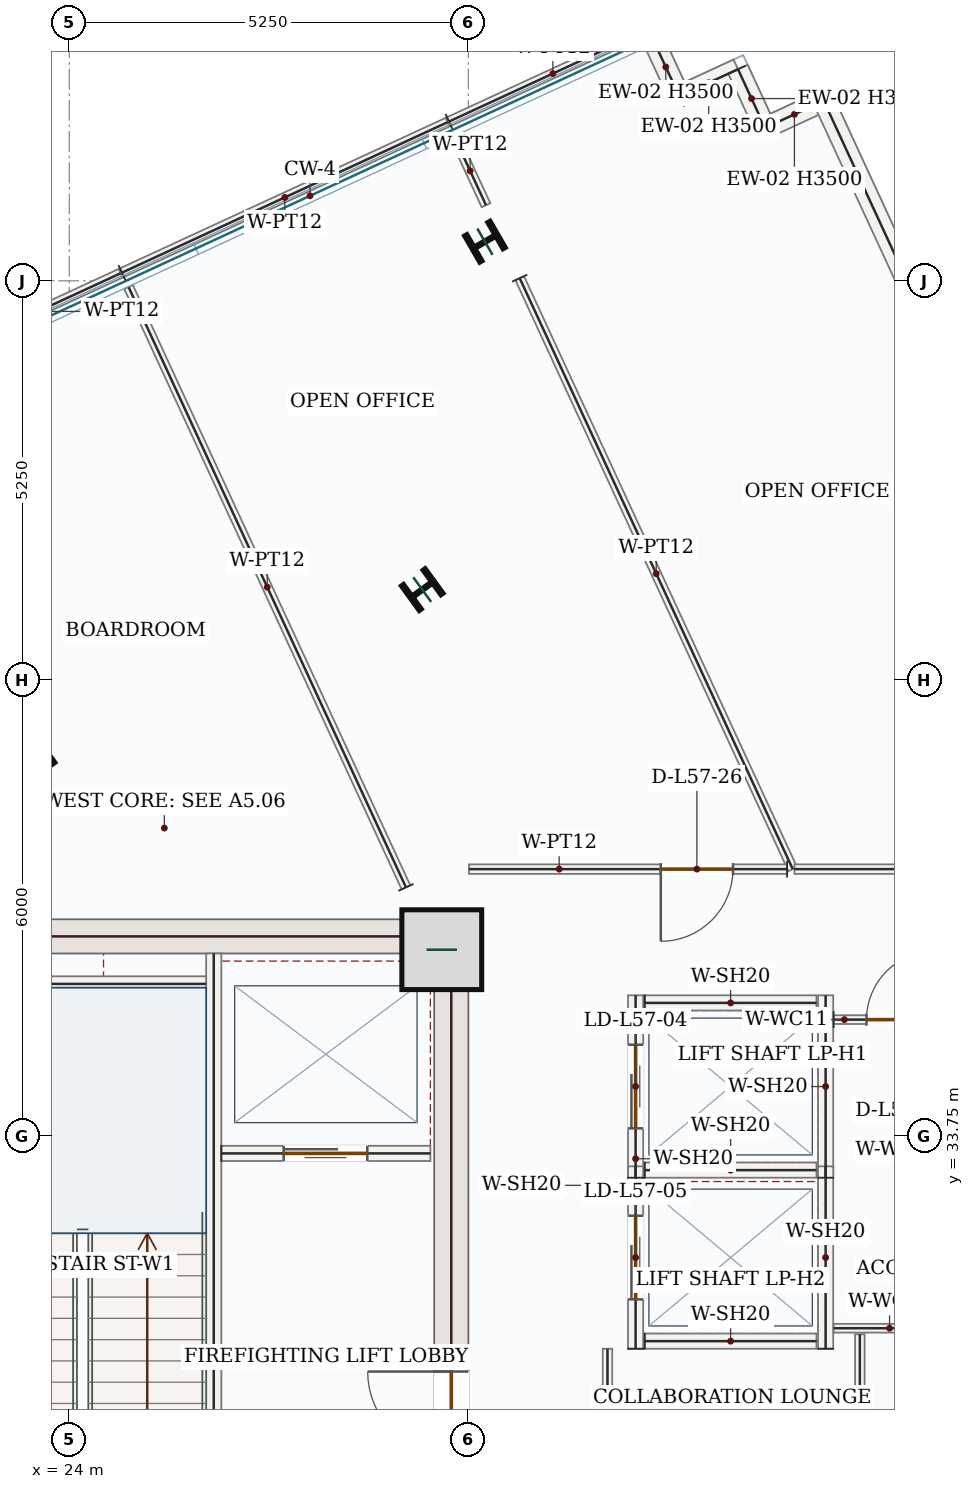
"""IFC4 building model, lengths in metres.
Left out: names, types, materials, properties, quantities, classifications, styles, units other than length and angle.
Written with IfcOpenShell. Run it as: python <this file> out.ifc"""

import sys

from ifc_helpers import new_model, si_unit, direction, frame, frame_2d, origin, origin_2d, place, context, subcontext, project, spatial, rectangle, i_section, extrude, source, transform, mapped, element, fill, save


model = new_model("IFC4")
c1 = context("Model", 3, precision=1e-05, world=origin(), true_north=direction((0.0, 1.0)))
c2 = subcontext(c1, "Body", "Model", "MODEL_VIEW")
j1 = project(units=[si_unit("LENGTHUNIT", "METRE"), si_unit("PLANEANGLEUNIT", "RADIAN")], contexts=[c1])
p1 = place(None, origin())
s1 = spatial("IfcSite", under=j1, at=p1, CompositionType="ELEMENT")
p2 = place(p1, origin())
s2 = spatial("IfcBuilding", under=s1, at=p2, CompositionType="ELEMENT")
p3 = place(p2, frame((0.0, 0.0, 242.85)))
s3 = spatial("IfcBuildingStorey", under=s2, at=p3, CompositionType="ELEMENT", Elevation=242.85)
p4 = place(p3, frame((29.025, 28.05, 0.0), z_axis=(0.0, 0.0, 1.0), x_axis=(0.0, 1.0, 0.0)))
e1 = element("IfcWall", 1, at=p4, inside=s3, PredefinedType="SHEAR", context=c2, shape_type="SweptSolid", body=[
    extrude(rectangle(XDim=8.55, YDim=0.45, at=frame_2d((4.275, 0.0))), origin(), (0.0, 0.0, 1.0), 3.5),
])
p5 = place(p4, frame((1.5, 0.0, 0.0)))
e2 = element("IfcOpeningElement", 2, at=p5, cuts=e1, PredefinedType="OPENING", context=c2, shape_type="SweptSolid", body=[
    extrude(rectangle(XDim=1.1, YDim=2.2, at=frame_2d((0.55, 1.1))), frame((0.0, 0.235, 0.0), z_axis=(0.0, -1.0, 0.0), x_axis=(1.0, 0.0, 0.0)), (0.0, 0.0, 1.0), 0.47),
])
m1 = source(origin(), c2, "Body", "SweptSolid", [
    extrude(rectangle(XDim=7.1, YDim=0.45, at=frame_2d((3.55, 0.0))), origin(), (0.0, 0.0, 1.0), 3.5),
])
p6 = place(p3, frame((21.7, 36.375, 0.0), z_axis=(0.0, 0.0, 1.0), x_axis=(1.0, 0.0, 0.0)))
e3 = element("IfcWall", 3, at=p6, inside=s3, PredefinedType="SHEAR", context=c2, shape_type="MappedRepresentation", body=[
    mapped(m1, transform((0.0, 0.0, 0.0), x_axis=(1.0, 0.0, 0.0), y_axis=(0.0, 1.0, 0.0), z_axis=(0.0, 0.0, 1.0), scale=1.0)),
])
m2 = source(origin(), c2, "Body", "SweptSolid", [
    extrude(rectangle(XDim=1.05, YDim=1.05, at=origin_2d()), origin(), (0.0, 0.0, 1.0), 3.75),
])
p7 = place(p3, frame((28.9, 36.2, 0.0), z_axis=(0.0, 0.0, 1.0), x_axis=(1.0, 0.0, 0.0)))
e4 = element("IfcColumn", 4, at=p7, inside=s3, PredefinedType="COLUMN", context=c2, shape_type="MappedRepresentation", body=[
    mapped(m2, transform((0.0, 0.0, 0.0), x_axis=(1.0, 0.0, 0.0), y_axis=(0.0, 1.0, 0.0), z_axis=(0.0, 0.0, 1.0), scale=1.0)),
])
m3 = source(origin(), c2, "Body", "SweptSolid", [
    extrude(i_section(OverallWidth=0.399, OverallDepth=0.386, WebThickness=0.021, FlangeThickness=0.033, FilletRadius=0.018, at=origin_2d()), origin(), (0.0, 0.0, 1.0), 3.75),
])
for number, where, z_axis, x_axis in (
    (5, (28.643, 40.937, 0.0), (0.0, 0.0, 1.0), (-0.588, 0.809, 0.0)),
    (6, (23.536, 38.711, 0.0), (0.0, 0.0, 1.0), (-0.588, 0.809, 0.0)),
    (7, (29.468, 45.514, 0.0), (0.0, 0.0, 1.0), (-0.5, 0.866, 0.0)),
):
    element("IfcColumn", number, at=place(p3, frame(where, z_axis=z_axis, x_axis=x_axis)), inside=s3, PredefinedType="COLUMN", context=c2, shape_type="MappedRepresentation", body=[
        mapped(m3, transform((0.0, 0.0, 0.0), x_axis=(1.0, 0.0, 0.0), y_axis=(0.0, 1.0, 0.0), z_axis=(0.0, 0.0, 1.0), scale=1.0)),
    ])
m4 = source(origin(), c2, "Body", "SweptSolid", [
    extrude(rectangle(XDim=0.85, YDim=0.28, at=frame_2d((0.425, 0.0))), origin(), (0.0, 0.0, 1.0), 3.5),
])
p8 = place(p3, frame((31.669, 48.198, 0.0), z_axis=(0.0, 0.0, 1.0), x_axis=(0.419422493365, -0.907791150023, 0.0)))
e8 = element("IfcWall", 8, at=p8, inside=s3, PredefinedType="SOLIDWALL", context=c2, shape_type="MappedRepresentation", body=[
    mapped(m4, transform((0.0, 0.0, 0.0), x_axis=(1.0, 0.0, 0.0), y_axis=(0.0, 1.0, 0.0), z_axis=(0.0, 0.0, 1.0), scale=1.0)),
])
m5 = source(origin(), c2, "Body", "SweptSolid", [
    extrude(rectangle(XDim=0.85, YDim=0.28, at=frame_2d((0.425, 0.0))), origin(), (0.0, 0.0, 1.0), 3.5),
])
p9 = place(p3, frame((32.025, 47.427, 0.0), z_axis=(0.0, 0.0, 1.0), x_axis=(0.907841666427, 0.419313139191, 0.0)))
e9 = element("IfcWall", 9, at=p9, inside=s3, PredefinedType="SOLIDWALL", context=c2, shape_type="MappedRepresentation", body=[
    mapped(m5, transform((0.0, 0.0, 0.0), x_axis=(1.0, 0.0, 0.0), y_axis=(0.0, 1.0, 0.0), z_axis=(0.0, 0.0, 1.0), scale=1.0)),
])
p10 = place(p3, frame((32.797, 47.783, 0.0), z_axis=(0.0, 0.0, 1.0), x_axis=(0.419422493365, -0.907791150023, 0.0)))
e10 = element("IfcWall", 10, at=p10, inside=s3, PredefinedType="SOLIDWALL", context=c2, shape_type="MappedRepresentation", body=[
    mapped(m4, transform((0.0, 0.0, 0.0), x_axis=(1.0, 0.0, 0.0), y_axis=(0.0, 1.0, 0.0), z_axis=(0.0, 0.0, 1.0), scale=1.0)),
])
p11 = place(p3, frame((33.154, 47.012, 0.0), z_axis=(0.0, 0.0, 1.0), x_axis=(0.907841666427, 0.419313139191, 0.0)))
e11 = element("IfcWall", 11, at=p11, inside=s3, PredefinedType="SOLIDWALL", context=c2, shape_type="MappedRepresentation", body=[
    mapped(m5, transform((0.0, 0.0, 0.0), x_axis=(1.0, 0.0, 0.0), y_axis=(0.0, 1.0, 0.0), z_axis=(0.0, 0.0, 1.0), scale=1.0)),
])
m6 = source(origin(), c2, "Body", "SweptSolid", [
    extrude(rectangle(XDim=8.932, YDim=0.28, at=frame_2d((4.466, 0.0))), origin(), (0.0, 0.0, 1.0), 3.5),
])
p12 = place(p3, frame((33.925, 47.368, 0.0), z_axis=(0.0, 0.0, 1.0), x_axis=(0.419437747849, -0.90778410191, 0.0)))
e12 = element("IfcWall", 12, at=p12, inside=s3, PredefinedType="SOLIDWALL", context=c2, shape_type="MappedRepresentation", body=[
    mapped(m6, transform((0.0, 0.0, 0.0), x_axis=(1.0, 0.0, 0.0), y_axis=(0.0, 1.0, 0.0), z_axis=(0.0, 0.0, 1.0), scale=1.0)),
])
p13 = place(p3, frame((25.9, 28.15, 0.0), z_axis=(0.0, 0.0, 1.0), x_axis=(0.0, 1.0, 0.0)))
e13 = element("IfcWall", 13, at=p13, inside=s3, PredefinedType="SOLIDWALL", context=c2, shape_type="SweptSolid", body=[
    extrude(rectangle(XDim=8.0, YDim=0.2, at=frame_2d((4.0, 0.0))), origin(), (0.0, 0.0, 1.0), 3.5),
])
p14 = place(p13, frame((0.4, 0.0, 0.0)))
e14 = element("IfcOpeningElement", 14, at=p14, cuts=e13, PredefinedType="OPENING", context=c2, shape_type="SweptSolid", body=[
    extrude(rectangle(XDim=1.05, YDim=2.15, at=frame_2d((0.525, 1.075))), frame((0.0, 0.11, 0.0), z_axis=(0.0, -1.0, 0.0), x_axis=(1.0, 0.0, 0.0)), (0.0, 0.0, 1.0), 0.22),
])
m7 = source(origin(), c2, "Body", "SweptSolid", [
    extrude(rectangle(XDim=3.25, YDim=0.2, at=frame_2d((1.625, 0.0))), origin(), (0.0, 0.0, 1.0), 3.5),
])
p15 = place(p3, frame((22.55, 35.75, 0.0), z_axis=(0.0, 0.0, 1.0), x_axis=(1.0, 0.0, 0.0)))
e15 = element("IfcWall", 15, at=p15, inside=s3, PredefinedType="SOLIDWALL", context=c2, shape_type="MappedRepresentation", body=[
    mapped(m7, transform((0.0, 0.0, 0.0), x_axis=(1.0, 0.0, 0.0), y_axis=(0.0, 1.0, 0.0), z_axis=(0.0, 0.0, 1.0), scale=1.0)),
])
p16 = place(p3, frame((26.0, 33.52, 0.0), z_axis=(0.0, 0.0, 1.0), x_axis=(1.0, 0.0, 0.0)))
e16 = element("IfcWall", 16, at=p16, inside=s3, PredefinedType="SOLIDWALL", context=c2, shape_type="SweptSolid", body=[
    extrude(rectangle(XDim=2.75, YDim=0.2, at=frame_2d((1.375, 0.0))), origin(), (0.0, 0.0, 1.0), 3.5),
])
p17 = place(p16, frame((0.82, 0.0, 0.0)))
e17 = element("IfcOpeningElement", 17, at=p17, cuts=e16, PredefinedType="OPENING", context=c2, shape_type="SweptSolid", body=[
    extrude(rectangle(XDim=1.1, YDim=2.15, at=frame_2d((0.55, 1.075))), frame((0.0, 0.11, 0.0), z_axis=(0.0, -1.0, 0.0), x_axis=(1.0, 0.0, 0.0)), (0.0, 0.0, 1.0), 0.22),
])
p18 = place(p3, frame((31.45, 33.2, 0.0), z_axis=(0.0, 0.0, 1.0), x_axis=(0.0, 1.0, 0.0)))
e18 = element("IfcWall", 18, at=p18, inside=s3, PredefinedType="SOLIDWALL", context=c2, shape_type="SweptSolid", body=[
    extrude(rectangle(XDim=2.4, YDim=0.2, at=frame_2d((1.2, 0.0))), origin(), (0.0, 0.0, 1.0), 3.5),
])
p19 = place(p18, frame((0.65, 0.0, 0.0)))
e19 = element("IfcOpeningElement", 19, at=p19, cuts=e18, PredefinedType="OPENING", context=c2, shape_type="SweptSolid", body=[
    extrude(rectangle(XDim=1.1, YDim=2.15, at=frame_2d((0.55, 1.075))), frame((0.0, 0.11, 0.0), z_axis=(0.0, -1.0, 0.0), x_axis=(1.0, 0.0, 0.0)), (0.0, 0.0, 1.0), 0.22),
])
m8 = source(origin(), c2, "Body", "SweptSolid", [
    extrude(rectangle(XDim=2.4, YDim=0.2, at=frame_2d((1.2, 0.0))), origin(), (0.0, 0.0, 1.0), 3.5),
])
p20 = place(p3, frame((33.95, 33.2, 0.0), z_axis=(0.0, 0.0, 1.0), x_axis=(0.0, 1.0, 0.0)))
e20 = element("IfcWall", 20, at=p20, inside=s3, PredefinedType="SOLIDWALL", context=c2, shape_type="MappedRepresentation", body=[
    mapped(m8, transform((0.0, 0.0, 0.0), x_axis=(1.0, 0.0, 0.0), y_axis=(0.0, 1.0, 0.0), z_axis=(0.0, 0.0, 1.0), scale=1.0)),
])
m9 = source(origin(), c2, "Body", "SweptSolid", [
    extrude(rectangle(XDim=2.26, YDim=0.2, at=frame_2d((1.13, 0.0))), origin(), (0.0, 0.0, 1.0), 3.5),
])
for number, where, z_axis, x_axis in (
    (21, (31.57, 33.3, 0.0), (0.0, 0.0, 1.0), (1.0, 0.0, 0.0)),
    (22, (31.57, 35.5, 0.0), (0.0, 0.0, 1.0), (1.0, 0.0, 0.0)),
):
    element("IfcWall", number, at=place(p3, frame(where, z_axis=z_axis, x_axis=x_axis)), inside=s3, PredefinedType="SOLIDWALL", context=c2, shape_type="MappedRepresentation", body=[
        mapped(m9, transform((0.0, 0.0, 0.0), x_axis=(1.0, 0.0, 0.0), y_axis=(0.0, 1.0, 0.0), z_axis=(0.0, 0.0, 1.0), scale=1.0)),
    ])
p21 = place(p3, frame((31.45, 30.95, 0.0), z_axis=(0.0, 0.0, 1.0), x_axis=(0.0, 1.0, 0.0)))
e23 = element("IfcWall", 23, at=p21, inside=s3, PredefinedType="SOLIDWALL", context=c2, shape_type="SweptSolid", body=[
    extrude(rectangle(XDim=2.4, YDim=0.2, at=frame_2d((1.2, 0.0))), origin(), (0.0, 0.0, 1.0), 3.5),
])
p22 = place(p21, frame((0.65, 0.0, 0.0)))
e24 = element("IfcOpeningElement", 24, at=p22, cuts=e23, PredefinedType="OPENING", context=c2, shape_type="SweptSolid", body=[
    extrude(rectangle(XDim=1.1, YDim=2.15, at=frame_2d((0.55, 1.075))), frame((0.0, 0.11, 0.0), z_axis=(0.0, -1.0, 0.0), x_axis=(1.0, 0.0, 0.0)), (0.0, 0.0, 1.0), 0.22),
])
p23 = place(p3, frame((33.95, 30.95, 0.0), z_axis=(0.0, 0.0, 1.0), x_axis=(0.0, 1.0, 0.0)))
e25 = element("IfcWall", 25, at=p23, inside=s3, PredefinedType="SOLIDWALL", context=c2, shape_type="MappedRepresentation", body=[
    mapped(m8, transform((0.0, 0.0, 0.0), x_axis=(1.0, 0.0, 0.0), y_axis=(0.0, 1.0, 0.0), z_axis=(0.0, 0.0, 1.0), scale=1.0)),
])
p24 = place(p3, frame((31.57, 31.05, 0.0), z_axis=(0.0, 0.0, 1.0), x_axis=(1.0, 0.0, 0.0)))
e26 = element("IfcWall", 26, at=p24, inside=s3, PredefinedType="SOLIDWALL", context=c2, shape_type="MappedRepresentation", body=[
    mapped(m9, transform((0.0, 0.0, 0.0), x_axis=(1.0, 0.0, 0.0), y_axis=(0.0, 1.0, 0.0), z_axis=(0.0, 0.0, 1.0), scale=1.0)),
])
m10 = source(origin(), c2, "Body", "SweptSolid", [
    extrude(rectangle(XDim=1.473, YDim=0.115, at=frame_2d((0.736, 0.0))), origin(), (0.0, 0.0, 1.0), 3.5),
])
p25 = place(p3, frame((35.528, 31.22, 0.0), z_axis=(0.0, 0.0, 1.0), x_axis=(-1.0, 0.0, 0.0)))
e27 = element("IfcWall", 27, at=p25, inside=s3, PredefinedType="PARTITIONING", context=c2, shape_type="MappedRepresentation", body=[
    mapped(m10, transform((0.0, 0.0, 0.0), x_axis=(1.0, 0.0, 0.0), y_axis=(0.0, 1.0, 0.0), z_axis=(0.0, 0.0, 1.0), scale=1.0)),
])
p26 = place(p3, frame((34.055, 35.28, 0.0), z_axis=(0.0, 0.0, 1.0), x_axis=(1.0, 0.0, 0.0)))
e28 = element("IfcWall", 28, at=p26, inside=s3, PredefinedType="PARTITIONING", context=c2, shape_type="SweptSolid", body=[
    extrude(rectangle(XDim=1.473, YDim=0.115, at=frame_2d((0.736, 0.0))), origin(), (0.0, 0.0, 1.0), 3.5),
])
p27 = place(p26, frame((0.433, 0.0, 0.0)))
e29 = element("IfcOpeningElement", 29, at=p27, cuts=e28, PredefinedType="OPENING", context=c2, shape_type="SweptSolid", body=[
    extrude(rectangle(XDim=0.9, YDim=2.1, at=frame_2d((0.45, 1.05))), frame((0.0, 0.067, 0.0), z_axis=(0.0, -1.0, 0.0), x_axis=(1.0, 0.0, 0.0)), (0.0, 0.0, 1.0), 0.135),
])
m11 = source(origin(), c2, "Body", "SweptSolid", [
    extrude(rectangle(XDim=3.2, YDim=0.125, at=frame_2d((1.6, 0.0))), origin(), (0.0, 0.0, 1.0), 3.5),
])
p28 = place(p3, frame((34.4, 27.94, 0.0), z_axis=(0.0, 0.0, 1.0), x_axis=(0.0, 1.0, 0.0)))
e30 = element("IfcWall", 30, at=p28, inside=s3, PredefinedType="PARTITIONING", context=c2, shape_type="MappedRepresentation", body=[
    mapped(m11, transform((0.0, 0.0, 0.0), x_axis=(1.0, 0.0, 0.0), y_axis=(0.0, 1.0, 0.0), z_axis=(0.0, 0.0, 1.0), scale=1.0)),
])
m12 = source(origin(), c2, "Body", "SweptSolid", [
    extrude(rectangle(XDim=2.942, YDim=0.125, at=frame_2d((1.471, 0.0))), origin(), (0.0, 0.0, 1.0), 3.5),
])
p29 = place(p3, frame((31.08, 28.008, 0.0), z_axis=(0.0, 0.0, 1.0), x_axis=(0.0, 1.0, 0.0)))
e31 = element("IfcWall", 31, at=p29, inside=s3, PredefinedType="PARTITIONING", context=c2, shape_type="MappedRepresentation", body=[
    mapped(m12, transform((0.0, 0.0, 0.0), x_axis=(1.0, 0.0, 0.0), y_axis=(0.0, 1.0, 0.0), z_axis=(0.0, 0.0, 1.0), scale=1.0)),
])
m13 = source(origin(), c2, "Body", "SweptSolid", [
    extrude(rectangle(XDim=8.564, YDim=0.125, at=frame_2d((4.282, 0.0))), origin(), (0.0, 0.0, 1.0), 3.5),
])
p30 = place(p3, frame((29.925, 45.034, 0.0), z_axis=(0.0, 0.0, 1.0), x_axis=(0.419463084945, -0.907772394584, 0.0)))
e32 = element("IfcWall", 32, at=p30, inside=s3, PredefinedType="PARTITIONING", context=c2, shape_type="MappedRepresentation", body=[
    mapped(m13, transform((0.0, 0.0, 0.0), x_axis=(1.0, 0.0, 0.0), y_axis=(0.0, 1.0, 0.0), z_axis=(0.0, 0.0, 1.0), scale=1.0)),
])
p31 = place(p3, frame((33.443, 37.26, 0.0), z_axis=(0.0, 0.0, 1.0), x_axis=(-0.999999998299, -5.8329445e-05, 0.0)))
e33 = element("IfcWall", 33, at=p31, inside=s3, PredefinedType="PARTITIONING", context=c2, shape_type="SweptSolid", body=[
    extrude(rectangle(XDim=4.186, YDim=0.125, at=frame_2d((2.093, 0.0))), origin(), (0.0, 0.0, 1.0), 3.5),
])
p32 = place(p31, frame((0.712, 0.0, 0.0)))
e34 = element("IfcOpeningElement", 34, at=p32, cuts=e33, PredefinedType="OPENING", context=c2, shape_type="SweptSolid", body=[
    extrude(rectangle(XDim=0.95, YDim=2.15, at=frame_2d((0.475, 1.075))), frame((0.0, 0.073, 0.0), z_axis=(0.0, -1.0, 0.0), x_axis=(1.0, 0.0, 0.0)), (0.0, 0.0, 1.0), 0.145),
])
m14 = source(origin(), c2, "Body", "SweptSolid", [
    extrude(rectangle(XDim=8.701, YDim=0.125, at=frame_2d((4.351, 0.0))), origin(), (0.0, 0.0, 1.0), 3.5),
])
p33 = place(p3, frame((28.429, 37.02, 0.0), z_axis=(0.0, 0.0, 1.0), x_axis=(-0.419458495046, 0.907774515468, 0.0)))
e35 = element("IfcWall", 35, at=p33, inside=s3, PredefinedType="PARTITIONING", context=c2, shape_type="MappedRepresentation", body=[
    mapped(m14, transform((0.0, 0.0, 0.0), x_axis=(1.0, 0.0, 0.0), y_axis=(0.0, 1.0, 0.0), z_axis=(0.0, 0.0, 1.0), scale=1.0)),
])
m15 = source(origin(), c2, "Body", "SweptSolid", [
    extrude(rectangle(XDim=4.72, YDim=0.125, at=frame_2d((2.36, 0.0))), origin(), (0.0, 0.0, 1.0), 3.5),
])
p34 = place(p3, frame((24.692, 45.107, 0.0), z_axis=(0.0, 0.0, 1.0), x_axis=(0.907753377062, 0.419504238873, 0.0)))
e36 = element("IfcWall", 36, at=p34, inside=s3, PredefinedType="PARTITIONING", context=c2, shape_type="MappedRepresentation", body=[
    mapped(m15, transform((0.0, 0.0, 0.0), x_axis=(1.0, 0.0, 0.0), y_axis=(0.0, 1.0, 0.0), z_axis=(0.0, 0.0, 1.0), scale=1.0)),
])
m16 = source(origin(), c2, "Body", "SweptSolid", [
    extrude(rectangle(XDim=0.996, YDim=0.125, at=frame_2d((0.498, 0.0))), origin(), (0.0, 0.0, 1.0), 3.5),
])
p35 = place(p3, frame((29.064, 46.898, 0.0), z_axis=(0.0, 0.0, 1.0), x_axis=(0.419540149112, -0.907736780836, 0.0)))
e37 = element("IfcWall", 37, at=p35, inside=s3, PredefinedType="PARTITIONING", context=c2, shape_type="MappedRepresentation", body=[
    mapped(m16, transform((0.0, 0.0, 0.0), x_axis=(1.0, 0.0, 0.0), y_axis=(0.0, 1.0, 0.0), z_axis=(0.0, 0.0, 1.0), scale=1.0)),
])
m17 = source(origin(), c2, "Body", "SweptSolid", [
    extrude(rectangle(XDim=2.39, YDim=0.125, at=frame_2d((1.195, 0.0))), origin(), (0.0, 0.0, 1.0), 3.5),
])
p36 = place(p3, frame((22.505, 44.096, 0.0), z_axis=(0.0, 0.0, 1.0), x_axis=(0.907773916688, 0.419459790898, 0.0)))
e38 = element("IfcWall", 38, at=p36, inside=s3, PredefinedType="PARTITIONING", context=c2, shape_type="MappedRepresentation", body=[
    mapped(m17, transform((0.0, 0.0, 0.0), x_axis=(1.0, 0.0, 0.0), y_axis=(0.0, 1.0, 0.0), z_axis=(0.0, 0.0, 1.0), scale=1.0)),
])
m18 = source(origin(), c2, "Body", "SweptSolid", [
    extrude(rectangle(XDim=3.01, YDim=0.125, at=frame_2d((1.505, 0.0))), origin(), (0.0, 0.0, 1.0), 3.5),
])
p37 = place(p3, frame((28.995, 47.095, 0.0), z_axis=(0.0, 0.0, 1.0), x_axis=(0.907790759102, 0.419423339467, 0.0)))
e39 = element("IfcWall", 39, at=p37, inside=s3, PredefinedType="PARTITIONING", context=c2, shape_type="MappedRepresentation", body=[
    mapped(m18, transform((0.0, 0.0, 0.0), x_axis=(1.0, 0.0, 0.0), y_axis=(0.0, 1.0, 0.0), z_axis=(0.0, 0.0, 1.0), scale=1.0)),
])
p38 = place(p3, frame((39.761, 37.26, 0.0), z_axis=(0.0, 0.0, 1.0), x_axis=(-1.0, 0.0, 0.0)))
e40 = element("IfcWall", 40, at=p38, inside=s3, PredefinedType="PARTITIONING", context=c2, shape_type="SweptSolid", body=[
    extrude(rectangle(XDim=6.221, YDim=0.125, at=frame_2d((3.111, 0.0))), origin(), (0.0, 0.0, 1.0), 3.5),
])
p39 = place(p38, frame((3.427, 0.0, 0.0)))
e41 = element("IfcOpeningElement", 41, at=p39, cuts=e40, PredefinedType="OPENING", context=c2, shape_type="SweptSolid", body=[
    extrude(rectangle(XDim=0.95, YDim=2.15, at=frame_2d((0.475, 1.075))), frame((0.0, 0.073, 0.0), z_axis=(0.0, -1.0, 0.0), x_axis=(1.0, 0.0, 0.0)), (0.0, 0.0, 1.0), 0.145),
])
m19 = source(origin(), c2, "Body", "SweptSolid", [
    extrude(rectangle(XDim=1.1, YDim=2.15, at=frame_2d((0.55, 1.075))), frame((0.0, 0.025, 0.0), z_axis=(0.0, -1.0, 0.0), x_axis=(1.0, 0.0, 0.0)), (0.0, 0.0, 1.0), 0.05),
])
p40 = place(p17, origin())
e42 = element("IfcDoor", 42, at=p40, inside=s3, OperationType="DOUBLE_DOOR_SLIDING", PredefinedType="DOOR", context=c2, shape_type="MappedRepresentation", body=[
    mapped(m19, transform((0.0, 0.0, 0.0), x_axis=(1.0, 0.0, 0.0), y_axis=(0.0, 1.0, 0.0), z_axis=(0.0, 0.0, 1.0), scale=1.0)),
])
fill(e17, e42)
m20 = source(origin(), c2, "Body", "SweptSolid", [
    extrude(rectangle(XDim=1.1, YDim=2.2, at=frame_2d((0.55, 1.1))), frame((0.0, 0.025, 0.0), z_axis=(0.0, -1.0, 0.0), x_axis=(1.0, 0.0, 0.0)), (0.0, 0.0, 1.0), 0.05),
])
p41 = place(p5, origin())
e43 = element("IfcDoor", 43, at=p41, inside=s3, OperationType="SINGLE_SWING_RIGHT", PredefinedType="DOOR", context=c2, shape_type="MappedRepresentation", body=[
    mapped(m20, transform((0.0, 0.0, 0.0), x_axis=(1.0, 0.0, 0.0), y_axis=(0.0, 1.0, 0.0), z_axis=(0.0, 0.0, 1.0), scale=1.0)),
])
fill(e2, e43)
p42 = place(p19, origin())
e44 = element("IfcDoor", 44, at=p42, inside=s3, OperationType="DOUBLE_DOOR_SLIDING", PredefinedType="DOOR", context=c2, shape_type="MappedRepresentation", body=[
    mapped(m19, transform((0.0, 0.0, 0.0), x_axis=(1.0, 0.0, 0.0), y_axis=(0.0, 1.0, 0.0), z_axis=(0.0, 0.0, 1.0), scale=1.0)),
])
fill(e19, e44)
p43 = place(p22, origin())
e45 = element("IfcDoor", 45, at=p43, inside=s3, OperationType="DOUBLE_DOOR_SLIDING", PredefinedType="DOOR", context=c2, shape_type="MappedRepresentation", body=[
    mapped(m19, transform((0.0, 0.0, 0.0), x_axis=(1.0, 0.0, 0.0), y_axis=(0.0, 1.0, 0.0), z_axis=(0.0, 0.0, 1.0), scale=1.0)),
])
fill(e24, e45)
m21 = source(origin(), c2, "Body", "SweptSolid", [
    extrude(rectangle(XDim=0.9, YDim=2.1, at=frame_2d((0.45, 1.05))), frame((0.0, 0.025, 0.0), z_axis=(0.0, -1.0, 0.0), x_axis=(1.0, 0.0, 0.0)), (0.0, 0.0, 1.0), 0.05),
])
p44 = place(p27, origin())
e46 = element("IfcDoor", 46, at=p44, inside=s3, OperationType="SINGLE_SWING_RIGHT", PredefinedType="DOOR", context=c2, shape_type="MappedRepresentation", body=[
    mapped(m21, transform((0.0, 0.0, 0.0), x_axis=(1.0, 0.0, 0.0), y_axis=(0.0, 1.0, 0.0), z_axis=(0.0, 0.0, 1.0), scale=1.0)),
])
fill(e29, e46)
m22 = source(origin(), c2, "Body", "SweptSolid", [
    extrude(rectangle(XDim=0.95, YDim=2.15, at=frame_2d((0.475, 1.075))), frame((0.0, 0.025, 0.0), z_axis=(0.0, -1.0, 0.0), x_axis=(1.0, 0.0, 0.0)), (0.0, 0.0, 1.0), 0.05),
])
p45 = place(p32, origin())
e47 = element("IfcDoor", 47, at=p45, inside=s3, OperationType="SINGLE_SWING_RIGHT", PredefinedType="DOOR", context=c2, shape_type="MappedRepresentation", body=[
    mapped(m22, transform((0.0, 0.0, 0.0), x_axis=(1.0, 0.0, 0.0), y_axis=(0.0, 1.0, 0.0), z_axis=(0.0, 0.0, 1.0), scale=1.0)),
])
fill(e34, e47)
save(model, sys.argv[1])
